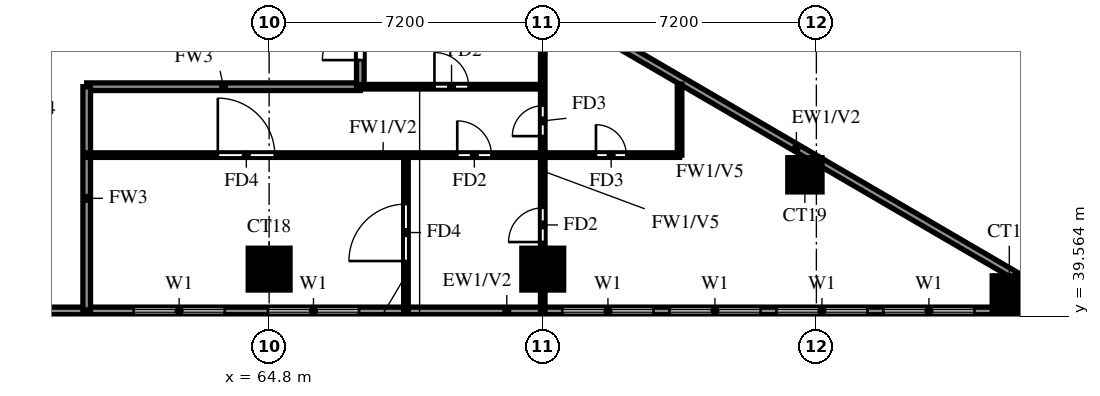
"""IFC4 building model, lengths in metres.
Left out: names, types, materials, properties, quantities, classifications, styles, units other than length and angle.
Written with IfcOpenShell. Run it as: python <this file> out.ifc"""

import sys

from ifc_helpers import new_model, si_unit, direction, frame, frame_2d, origin, origin_2d, place, context, subcontext, project, spatial, rectangle, extrude, source, transform, mapped, element, fill, save


model = new_model("IFC4")
c1 = context("Model", 3, precision=1e-05, world=origin(), true_north=direction((0.0, 1.0)))
c2 = subcontext(c1, "Body", "Model", "MODEL_VIEW")
j1 = project(units=[si_unit("LENGTHUNIT", "METRE"), si_unit("PLANEANGLEUNIT", "RADIAN")], contexts=[c1])
p1 = place(None, origin())
s1 = spatial("IfcSite", under=j1, at=p1, CompositionType="ELEMENT")
p2 = place(p1, origin())
s2 = spatial("IfcBuilding", under=s1, at=p2, CompositionType="ELEMENT")
p3 = place(p2, frame((0.0, 0.0, 120.0)))
s3 = spatial("IfcBuildingStorey", under=s2, at=p3, CompositionType="ELEMENT", Elevation=120.0)
m1 = source(origin(), c2, "Body", "SweptSolid", [
    extrude(rectangle(XDim=0.9, YDim=0.9, at=origin_2d()), origin(), (0.0, 0.0, 1.0), 3.2),
])
p4 = place(p3, frame((84.276, 40.174, 0.0), z_axis=(0.0, 0.0, 1.0), x_axis=(1.0, 0.0, 0.0)))
e1 = element("IfcColumn", 1, at=p4, inside=s3, PredefinedType="COLUMN", context=c2, shape_type="MappedRepresentation", body=[
    mapped(m1, transform((0.0, 0.0, 0.0))),
])
m2 = source(origin(), c2, "Body", "SweptSolid", [
    extrude(rectangle(XDim=1.1, YDim=1.1, at=origin_2d()), origin(), (0.0, 0.0, 1.0), 3.2),
])
for number, where, z_axis, x_axis in (
    (2, (64.8, 40.8, 0.0), (0.0, 0.0, 1.0), (1.0, 0.0, 0.0)),
    (3, (72.0, 40.8, 0.0), (0.0, 0.0, 1.0), (1.0, 0.0, 0.0)),
):
    element("IfcColumn", number, at=place(p3, frame(where, z_axis=z_axis, x_axis=x_axis)), inside=s3, PredefinedType="COLUMN", context=c2, shape_type="MappedRepresentation", body=[
        mapped(m2, transform((0.0, 0.0, 0.0))),
    ])
p5 = place(p3, frame((78.898, 43.282, 0.0), z_axis=(0.0, 0.0, 1.0), x_axis=(1.0, 0.0, 0.0)))
e4 = element("IfcColumn", 4, at=p5, inside=s3, PredefinedType="COLUMN", context=c2, shape_type="MappedRepresentation", body=[
    mapped(m1, transform((0.0, 0.0, 0.0))),
])
p6 = place(p3, frame((85.719, 39.881, 0.0), z_axis=(0.0, 0.0, 1.0), x_axis=(-0.86377618652, 0.503875678716, 0.0)))
e5 = element("IfcWall", 5, at=p6, inside=s3, PredefinedType="SOLIDWALL", context=c2, shape_type="SweptSolid", body=[
    extrude(rectangle(XDim=16.311, YDim=0.2, at=frame_2d((8.156, 0.0))), origin(), (0.0, 0.0, 1.0), 3.2),
])
p7 = place(p6, frame((13.326, 0.0, 1.5)))
e6 = element("IfcOpeningElement", 6, at=p7, cuts=e5, PredefinedType="OPENING", context=c2, shape_type="SweptSolid", body=[
    extrude(rectangle(XDim=0.9, YDim=0.9, at=frame_2d((0.45, 0.45))), frame((0.0, 0.11, 0.0), z_axis=(0.0, -1.0, 0.0), x_axis=(1.0, 0.0, 0.0)), (0.0, 0.0, 1.0), 0.22),
])
p8 = place(p3, frame((58.8, 39.7, 0.0), z_axis=(0.0, 0.0, 1.0), x_axis=(1.0, 0.0, 0.0)))
e7 = element("IfcWall", 7, at=p8, inside=s3, PredefinedType="SOLIDWALL", context=c2, shape_type="SweptSolid", body=[
    extrude(rectangle(XDim=27.23, YDim=0.2, at=frame_2d((13.615, 0.0))), origin(), (0.0, 0.0, 1.0), 3.2),
])
p9 = place(p8, frame((2.433, 0.0, 0.6)))
e8 = element("IfcOpeningElement", 8, at=p9, cuts=e7, PredefinedType="OPENING", context=c2, shape_type="SweptSolid", body=[
    extrude(rectangle(XDim=2.4, YDim=2.4, at=frame_2d((1.2, 1.2))), frame((0.0, 0.11, 0.0), z_axis=(0.0, -1.0, 0.0), x_axis=(1.0, 0.0, 0.0)), (0.0, 0.0, 1.0), 0.22),
])
p10 = place(p8, frame((5.967, 0.0, 0.6)))
e9 = element("IfcOpeningElement", 9, at=p10, cuts=e7, PredefinedType="OPENING", context=c2, shape_type="SweptSolid", body=[
    extrude(rectangle(XDim=2.4, YDim=2.4, at=frame_2d((1.2, 1.2))), frame((0.0, 0.11, 0.0), z_axis=(0.0, -1.0, 0.0), x_axis=(1.0, 0.0, 0.0)), (0.0, 0.0, 1.0), 0.22),
])
p11 = place(p8, frame((13.715, 0.0, 0.6)))
e10 = element("IfcOpeningElement", 10, at=p11, cuts=e7, PredefinedType="OPENING", context=c2, shape_type="SweptSolid", body=[
    extrude(rectangle(XDim=2.4, YDim=2.4, at=frame_2d((1.2, 1.2))), frame((0.0, 0.11, 0.0), z_axis=(0.0, -1.0, 0.0), x_axis=(1.0, 0.0, 0.0)), (0.0, 0.0, 1.0), 0.22),
])
p12 = place(p8, frame((16.531, 0.0, 0.6)))
e11 = element("IfcOpeningElement", 11, at=p12, cuts=e7, PredefinedType="OPENING", context=c2, shape_type="SweptSolid", body=[
    extrude(rectangle(XDim=2.4, YDim=2.4, at=frame_2d((1.2, 1.2))), frame((0.0, 0.11, 0.0), z_axis=(0.0, -1.0, 0.0), x_axis=(1.0, 0.0, 0.0)), (0.0, 0.0, 1.0), 0.22),
])
p13 = place(p8, frame((19.346, 0.0, 0.6)))
e12 = element("IfcOpeningElement", 12, at=p13, cuts=e7, PredefinedType="OPENING", context=c2, shape_type="SweptSolid", body=[
    extrude(rectangle(XDim=2.4, YDim=2.4, at=frame_2d((1.2, 1.2))), frame((0.0, 0.11, 0.0), z_axis=(0.0, -1.0, 0.0), x_axis=(1.0, 0.0, 0.0)), (0.0, 0.0, 1.0), 0.22),
])
p14 = place(p8, frame((22.161, 0.0, 0.6)))
e13 = element("IfcOpeningElement", 13, at=p14, cuts=e7, PredefinedType="OPENING", context=c2, shape_type="SweptSolid", body=[
    extrude(rectangle(XDim=2.4, YDim=2.4, at=frame_2d((1.2, 1.2))), frame((0.0, 0.11, 0.0), z_axis=(0.0, -1.0, 0.0), x_axis=(1.0, 0.0, 0.0)), (0.0, 0.0, 1.0), 0.22),
])
p15 = place(p8, frame((26.003, 0.0, 0.6)))
e14 = element("IfcOpeningElement", 14, at=p15, cuts=e7, PredefinedType="OPENING", context=c2, shape_type="SweptSolid", body=[
    extrude(rectangle(XDim=0.9, YDim=2.4, at=frame_2d((0.45, 1.2))), frame((0.0, 0.11, 0.0), z_axis=(0.0, -1.0, 0.0), x_axis=(1.0, 0.0, 0.0)), (0.0, 0.0, 1.0), 0.22),
])
p16 = place(p3, frame((58.5, 37.2, -0.3), z_axis=(0.0, 0.0, 1.0), x_axis=(0.0, 1.0, 0.0)))
e15 = element("IfcWall", 15, at=p16, inside=s3, PredefinedType="SOLIDWALL", context=c2, shape_type="SweptSolid", body=[
    extrude(rectangle(XDim=2.4, YDim=1.8, at=frame_2d((1.2, 0.0))), origin(), (0.0, 0.0, 1.0), 3.5),
])
p17 = place(p3, frame((60.0, 45.6, 0.0), z_axis=(0.0, 0.0, 1.0), x_axis=(1.0, 0.0, 0.0)))
e16 = element("IfcWall", 16, at=p17, inside=s3, PredefinedType="SOLIDWALL", context=c2, shape_type="SweptSolid", body=[
    extrude(rectangle(XDim=7.2, YDim=0.2, at=frame_2d((3.6, 0.0))), origin(), (0.0, 0.0, 1.0), 3.2),
])
p18 = place(p3, frame((60.0, 39.725, 0.0), z_axis=(0.0, 0.0, 1.0), x_axis=(0.0, 1.0, 0.0)))
e17 = element("IfcWall", 17, at=p18, inside=s3, PredefinedType="SOLIDWALL", context=c2, shape_type="SweptSolid", body=[
    extrude(rectangle(XDim=5.875, YDim=0.2, at=frame_2d((2.938, 0.0))), origin(), (0.0, 0.0, 1.0), 3.2),
])
p19 = place(p3, frame((67.2, 45.6, 0.0), z_axis=(0.0, 0.0, 1.0), x_axis=(0.0, 1.0, 0.0)))
e18 = element("IfcWall", 18, at=p19, inside=s3, PredefinedType="SOLIDWALL", context=c2, shape_type="SweptSolid", body=[
    extrude(rectangle(XDim=8.4, YDim=0.2, at=frame_2d((4.2, 0.0))), origin(), (0.0, 0.0, 1.0), 3.2),
])
p20 = place(p19, frame((0.7, 0.0, 0.0)))
e19 = element("IfcOpeningElement", 19, at=p20, cuts=e18, PredefinedType="OPENING", context=c2, shape_type="SweptSolid", body=[
    extrude(rectangle(XDim=1.0, YDim=2.1, at=frame_2d((0.5, 1.05))), frame((0.0, 0.11, 0.0), z_axis=(0.0, -1.0, 0.0), x_axis=(1.0, 0.0, 0.0)), (0.0, 0.0, 1.0), 0.22),
])
p21 = place(p3, frame((60.0, 43.8, 0.0), z_axis=(0.0, 0.0, 1.0), x_axis=(1.0, 0.0, 0.0)))
e20 = element("IfcWall", 20, at=p21, inside=s3, PredefinedType="PARTITIONING", context=c2, shape_type="SweptSolid", body=[
    extrude(rectangle(XDim=15.6, YDim=0.12, at=frame_2d((7.8, 0.0))), origin(), (0.0, 0.0, 1.0), 3.2),
])
p22 = place(p21, frame((9.75, 0.0, 0.0)))
e21 = element("IfcOpeningElement", 21, at=p22, cuts=e20, PredefinedType="OPENING", context=c2, shape_type="SweptSolid", body=[
    extrude(rectangle(XDim=0.9, YDim=2.1, at=frame_2d((0.45, 1.05))), frame((0.0, 0.07, 0.0), z_axis=(0.0, -1.0, 0.0), x_axis=(1.0, 0.0, 0.0)), (0.0, 0.0, 1.0), 0.14),
])
p23 = place(p21, frame((3.45, 0.0, 0.0)))
e22 = element("IfcOpeningElement", 22, at=p23, cuts=e20, PredefinedType="OPENING", context=c2, shape_type="SweptSolid", body=[
    extrude(rectangle(XDim=1.5, YDim=2.1, at=frame_2d((0.75, 1.05))), frame((0.0, 0.07, 0.0), z_axis=(0.0, -1.0, 0.0), x_axis=(1.0, 0.0, 0.0)), (0.0, 0.0, 1.0), 0.14),
])
p24 = place(p21, frame((13.4, 0.0, 0.0)))
e23 = element("IfcOpeningElement", 23, at=p24, cuts=e20, PredefinedType="OPENING", context=c2, shape_type="SweptSolid", body=[
    extrude(rectangle(XDim=0.8, YDim=2.1, at=frame_2d((0.4, 1.05))), frame((0.0, 0.07, 0.0), z_axis=(0.0, -1.0, 0.0), x_axis=(1.0, 0.0, 0.0)), (0.0, 0.0, 1.0), 0.14),
])
p25 = place(p3, frame((67.2, 45.6, 0.0), z_axis=(0.0, 0.0, 1.0), x_axis=(1.0, 0.0, 0.0)))
e24 = element("IfcWall", 24, at=p25, inside=s3, PredefinedType="PARTITIONING", context=c2, shape_type="SweptSolid", body=[
    extrude(rectangle(XDim=4.8, YDim=0.12, at=frame_2d((2.4, 0.0))), origin(), (0.0, 0.0, 1.0), 3.2),
])
p26 = place(p25, frame((1.95, 0.0, 0.0)))
e25 = element("IfcOpeningElement", 25, at=p26, cuts=e24, PredefinedType="OPENING", context=c2, shape_type="SweptSolid", body=[
    extrude(rectangle(XDim=0.9, YDim=2.1, at=frame_2d((0.45, 1.05))), frame((0.0, 0.07, 0.0), z_axis=(0.0, -1.0, 0.0), x_axis=(1.0, 0.0, 0.0)), (0.0, 0.0, 1.0), 0.14),
])
p27 = place(p3, frame((68.4, 39.725, 0.0), z_axis=(0.0, 0.0, 1.0), x_axis=(0.0, 1.0, 0.0)))
e26 = element("IfcWall", 26, at=p27, inside=s3, PredefinedType="PARTITIONING", context=c2, shape_type="SweptSolid", body=[
    extrude(rectangle(XDim=4.075, YDim=0.12, at=frame_2d((2.038, 0.0))), origin(), (0.0, 0.0, 1.0), 3.2),
])
p28 = place(p27, frame((1.288, 0.0, 0.0)))
e27 = element("IfcOpeningElement", 27, at=p28, cuts=e26, PredefinedType="OPENING", context=c2, shape_type="SweptSolid", body=[
    extrude(rectangle(XDim=1.5, YDim=2.1, at=frame_2d((0.75, 1.05))), frame((0.0, 0.07, 0.0), z_axis=(0.0, -1.0, 0.0), x_axis=(1.0, 0.0, 0.0)), (0.0, 0.0, 1.0), 0.14),
])
p29 = place(p3, frame((72.0, 39.725, 0.0), z_axis=(0.0, 0.0, 1.0), x_axis=(0.0, 1.0, 0.0)))
e28 = element("IfcWall", 28, at=p29, inside=s3, PredefinedType="PARTITIONING", context=c2, shape_type="SweptSolid", body=[
    extrude(rectangle(XDim=8.13, YDim=0.12, at=frame_2d((4.065, 0.0))), origin(), (0.0, 0.0, 1.0), 2.3),
])
p30 = place(p29, frame((1.788, 0.0, 0.0)))
e29 = element("IfcOpeningElement", 29, at=p30, cuts=e28, PredefinedType="OPENING", context=c2, shape_type="SweptSolid", body=[
    extrude(rectangle(XDim=0.9, YDim=2.1, at=frame_2d((0.45, 1.05))), frame((0.0, 0.07, 0.0), z_axis=(0.0, -1.0, 0.0), x_axis=(1.0, 0.0, 0.0)), (0.0, 0.0, 1.0), 0.14),
])
p31 = place(p29, frame((4.575, 0.0, 0.0)))
e30 = element("IfcOpeningElement", 30, at=p31, cuts=e28, PredefinedType="OPENING", context=c2, shape_type="SweptSolid", body=[
    extrude(rectangle(XDim=0.8, YDim=2.1, at=frame_2d((0.4, 1.05))), frame((0.0, 0.07, 0.0), z_axis=(0.0, -1.0, 0.0), x_axis=(1.0, 0.0, 0.0)), (0.0, 0.0, 1.0), 0.14),
])
p32 = place(p3, frame((75.6, 43.8, 0.0), z_axis=(0.0, 0.0, 1.0), x_axis=(0.0, 1.0, 0.0)))
e31 = element("IfcWall", 31, at=p32, inside=s3, PredefinedType="PARTITIONING", context=c2, shape_type="SweptSolid", body=[
    extrude(rectangle(XDim=1.868, YDim=0.12, at=frame_2d((0.934, 0.0))), origin(), (0.0, 0.0, 1.0), 2.3),
])
p33 = place(p9, origin())
e32 = element("IfcWindow", 32, at=p33, inside=s3, PartitioningType="DOUBLE_PANEL_VERTICAL", PredefinedType="WINDOW", context=c2, shape_type="SweptSolid", body=[
    extrude(rectangle(XDim=2.4, YDim=2.4, at=frame_2d((1.2, 1.2))), frame((0.0, 0.03, 0.0), z_axis=(0.0, -1.0, 0.0), x_axis=(1.0, 0.0, 0.0)), (0.0, 0.0, 1.0), 0.06),
])
fill(e8, e32)
p34 = place(p10, origin())
e33 = element("IfcWindow", 33, at=p34, inside=s3, PartitioningType="DOUBLE_PANEL_VERTICAL", PredefinedType="WINDOW", context=c2, shape_type="SweptSolid", body=[
    extrude(rectangle(XDim=2.4, YDim=2.4, at=frame_2d((1.2, 1.2))), frame((0.0, 0.03, 0.0), z_axis=(0.0, -1.0, 0.0), x_axis=(1.0, 0.0, 0.0)), (0.0, 0.0, 1.0), 0.06),
])
fill(e9, e33)
p35 = place(p11, origin())
e34 = element("IfcWindow", 34, at=p35, inside=s3, PartitioningType="DOUBLE_PANEL_VERTICAL", PredefinedType="WINDOW", context=c2, shape_type="SweptSolid", body=[
    extrude(rectangle(XDim=2.4, YDim=2.4, at=frame_2d((1.2, 1.2))), frame((0.0, 0.03, 0.0), z_axis=(0.0, -1.0, 0.0), x_axis=(1.0, 0.0, 0.0)), (0.0, 0.0, 1.0), 0.06),
])
fill(e10, e34)
p36 = place(p12, origin())
e35 = element("IfcWindow", 35, at=p36, inside=s3, PartitioningType="DOUBLE_PANEL_VERTICAL", PredefinedType="WINDOW", context=c2, shape_type="SweptSolid", body=[
    extrude(rectangle(XDim=2.4, YDim=2.4, at=frame_2d((1.2, 1.2))), frame((0.0, 0.03, 0.0), z_axis=(0.0, -1.0, 0.0), x_axis=(1.0, 0.0, 0.0)), (0.0, 0.0, 1.0), 0.06),
])
fill(e11, e35)
p37 = place(p13, origin())
e36 = element("IfcWindow", 36, at=p37, inside=s3, PartitioningType="DOUBLE_PANEL_VERTICAL", PredefinedType="WINDOW", context=c2, shape_type="SweptSolid", body=[
    extrude(rectangle(XDim=2.4, YDim=2.4, at=frame_2d((1.2, 1.2))), frame((0.0, 0.03, 0.0), z_axis=(0.0, -1.0, 0.0), x_axis=(1.0, 0.0, 0.0)), (0.0, 0.0, 1.0), 0.06),
])
fill(e12, e36)
p38 = place(p14, origin())
e37 = element("IfcWindow", 37, at=p38, inside=s3, PartitioningType="DOUBLE_PANEL_VERTICAL", PredefinedType="WINDOW", context=c2, shape_type="SweptSolid", body=[
    extrude(rectangle(XDim=2.4, YDim=2.4, at=frame_2d((1.2, 1.2))), frame((0.0, 0.03, 0.0), z_axis=(0.0, -1.0, 0.0), x_axis=(1.0, 0.0, 0.0)), (0.0, 0.0, 1.0), 0.06),
])
fill(e13, e37)
p39 = place(p28, origin())
e38 = element("IfcDoor", 38, at=p39, inside=s3, OperationType="SINGLE_SWING_LEFT", PredefinedType="DOOR", context=c2, shape_type="SweptSolid", body=[
    extrude(rectangle(XDim=1.5, YDim=2.1, at=frame_2d((0.75, 1.05))), frame((0.0, 0.025, 0.0), z_axis=(0.0, -1.0, 0.0), x_axis=(1.0, 0.0, 0.0)), (0.0, 0.0, 1.0), 0.05),
])
fill(e27, e38)
p40 = place(p26, origin())
e39 = element("IfcDoor", 39, at=p40, inside=s3, OperationType="SINGLE_SWING_RIGHT", PredefinedType="DOOR", context=c2, shape_type="SweptSolid", body=[
    extrude(rectangle(XDim=0.9, YDim=2.1, at=frame_2d((0.45, 1.05))), frame((0.0, 0.025, 0.0), z_axis=(0.0, -1.0, 0.0), x_axis=(1.0, 0.0, 0.0)), (0.0, 0.0, 1.0), 0.05),
])
fill(e25, e39)
p41 = place(p20, origin())
e40 = element("IfcDoor", 40, at=p41, inside=s3, OperationType="SINGLE_SWING_LEFT", PredefinedType="DOOR", context=c2, shape_type="SweptSolid", body=[
    extrude(rectangle(XDim=1.0, YDim=2.1, at=frame_2d((0.5, 1.05))), frame((0.0, 0.025, 0.0), z_axis=(0.0, -1.0, 0.0), x_axis=(1.0, 0.0, 0.0)), (0.0, 0.0, 1.0), 0.05),
])
fill(e19, e40)
p42 = place(p22, origin())
e41 = element("IfcDoor", 41, at=p42, inside=s3, OperationType="SINGLE_SWING_LEFT", PredefinedType="DOOR", context=c2, shape_type="SweptSolid", body=[
    extrude(rectangle(XDim=0.9, YDim=2.1, at=frame_2d((0.45, 1.05))), frame((0.0, 0.025, 0.0), z_axis=(0.0, -1.0, 0.0), x_axis=(1.0, 0.0, 0.0)), (0.0, 0.0, 1.0), 0.05),
])
fill(e21, e41)
p43 = place(p23, origin())
e42 = element("IfcDoor", 42, at=p43, inside=s3, OperationType="SINGLE_SWING_RIGHT", PredefinedType="DOOR", context=c2, shape_type="SweptSolid", body=[
    extrude(rectangle(XDim=1.5, YDim=2.1, at=frame_2d((0.75, 1.05))), frame((0.0, 0.025, 0.0), z_axis=(0.0, -1.0, 0.0), x_axis=(1.0, 0.0, 0.0)), (0.0, 0.0, 1.0), 0.05),
])
fill(e22, e42)
p44 = place(p30, origin())
e43 = element("IfcDoor", 43, at=p44, inside=s3, OperationType="SINGLE_SWING_RIGHT", PredefinedType="DOOR", context=c2, shape_type="SweptSolid", body=[
    extrude(rectangle(XDim=0.9, YDim=2.1, at=frame_2d((0.45, 1.05))), frame((0.0, 0.025, 0.0), z_axis=(0.0, -1.0, 0.0), x_axis=(1.0, 0.0, 0.0)), (0.0, 0.0, 1.0), 0.05),
])
fill(e29, e43)
p45 = place(p31, origin())
e44 = element("IfcDoor", 44, at=p45, inside=s3, OperationType="SINGLE_SWING_LEFT", PredefinedType="DOOR", context=c2, shape_type="SweptSolid", body=[
    extrude(rectangle(XDim=0.8, YDim=2.1, at=frame_2d((0.4, 1.05))), frame((0.0, 0.025, 0.0), z_axis=(0.0, -1.0, 0.0), x_axis=(1.0, 0.0, 0.0)), (0.0, 0.0, 1.0), 0.05),
])
fill(e30, e44)
p46 = place(p24, origin())
e45 = element("IfcDoor", 45, at=p46, inside=s3, OperationType="SINGLE_SWING_RIGHT", PredefinedType="DOOR", context=c2, shape_type="SweptSolid", body=[
    extrude(rectangle(XDim=0.8, YDim=2.1, at=frame_2d((0.4, 1.05))), frame((0.0, 0.025, 0.0), z_axis=(0.0, -1.0, 0.0), x_axis=(1.0, 0.0, 0.0)), (0.0, 0.0, 1.0), 0.05),
])
fill(e23, e45)
save(model, sys.argv[1])
